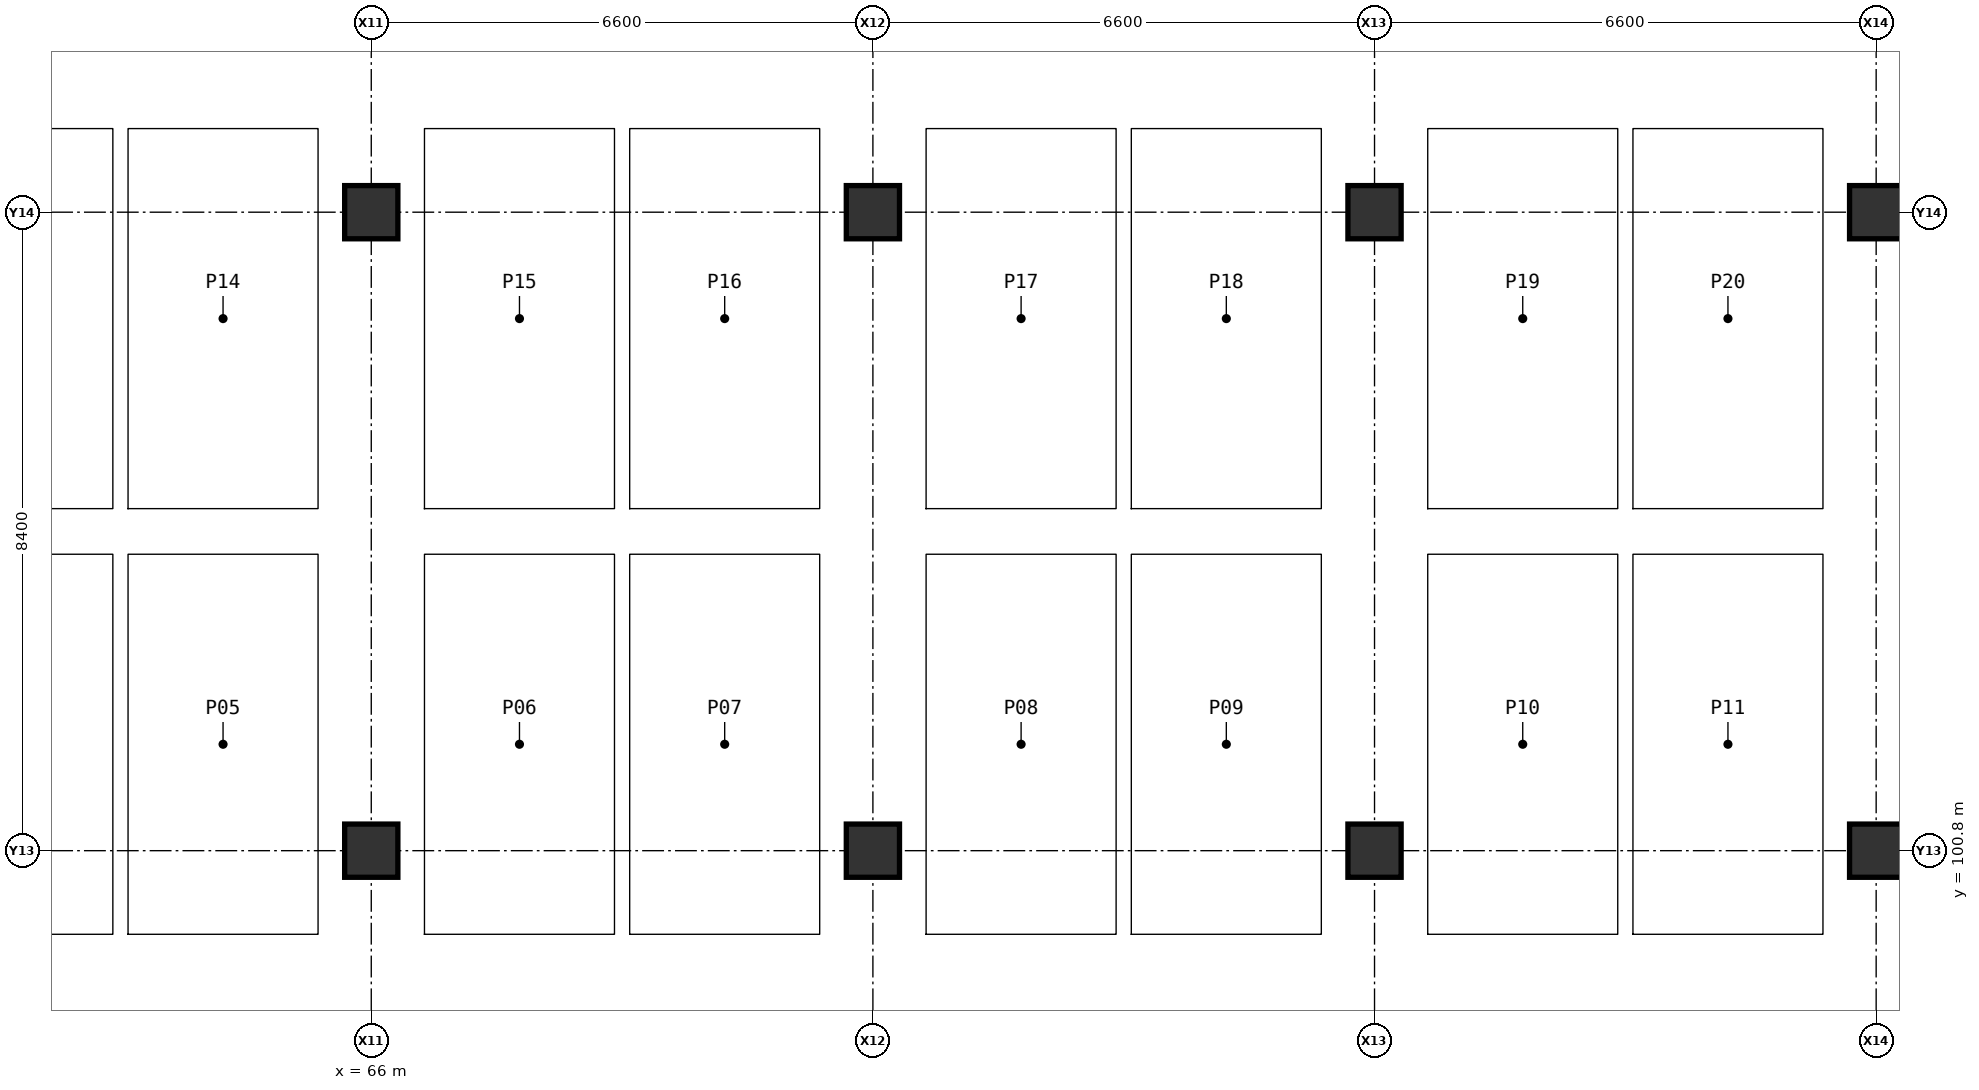
"""IFC4 building model, lengths in metres.
Left out: names, types, materials, properties, quantities, classifications, styles, units other than length and angle.
Written with IfcOpenShell. Run it as: python <this file> out.ifc"""

import sys

from ifc_helpers import new_model, si_unit, direction, frame, origin, origin_2d, place, context, subcontext, project, spatial, rectangle, extrude, element, save


model = new_model("IFC4")
c1 = context("Model", 3, precision=1e-05, world=origin(), true_north=direction((0.0, 1.0)))
c2 = subcontext(c1, "Body", "Model", "MODEL_VIEW")
j1 = project(units=[si_unit("LENGTHUNIT", "METRE"), si_unit("PLANEANGLEUNIT", "RADIAN")], contexts=[c1])
p1 = place(None, origin())
s1 = spatial("IfcSite", under=j1, at=p1, CompositionType="ELEMENT")
p2 = place(p1, origin())
s2 = spatial("IfcBuilding", under=s1, at=p2, CompositionType="ELEMENT")
p3 = place(p2, frame((0.0, 0.0, -4.5)))
s3 = spatial("IfcBuildingStorey", under=s2, at=p3, CompositionType="ELEMENT", Elevation=-4.5)
for number, where, z_axis, x_axis in (
    (1, (66.0, 100.8, 0.0), (0.0, 0.0, 1.0), (1.0, 0.0, 0.0)),
    (2, (66.0, 109.2, 0.0), (0.0, 0.0, 1.0), (1.0, 0.0, 0.0)),
    (3, (72.6, 100.8, 0.0), (0.0, 0.0, 1.0), (1.0, 0.0, 0.0)),
    (4, (72.6, 109.2, 0.0), (0.0, 0.0, 1.0), (1.0, 0.0, 0.0)),
    (5, (79.2, 100.8, 0.0), (0.0, 0.0, 1.0), (1.0, 0.0, 0.0)),
    (6, (79.2, 109.2, 0.0), (0.0, 0.0, 1.0), (1.0, 0.0, 0.0)),
    (7, (85.8, 100.8, 0.0), (0.0, 0.0, 1.0), (1.0, 0.0, 0.0)),
    (8, (85.8, 109.2, 0.0), (0.0, 0.0, 1.0), (1.0, 0.0, 0.0)),
):
    element("IfcColumn", number, at=place(p3, frame(where, z_axis=z_axis, x_axis=x_axis)), inside=s3, PredefinedType="COLUMN", context=c2, shape_type="SweptSolid", body=[
        extrude(rectangle(XDim=0.7, YDim=0.7, at=origin_2d()), origin(), (0.0, 0.0, 1.0), 4.5),
    ])
save(model, sys.argv[1])
